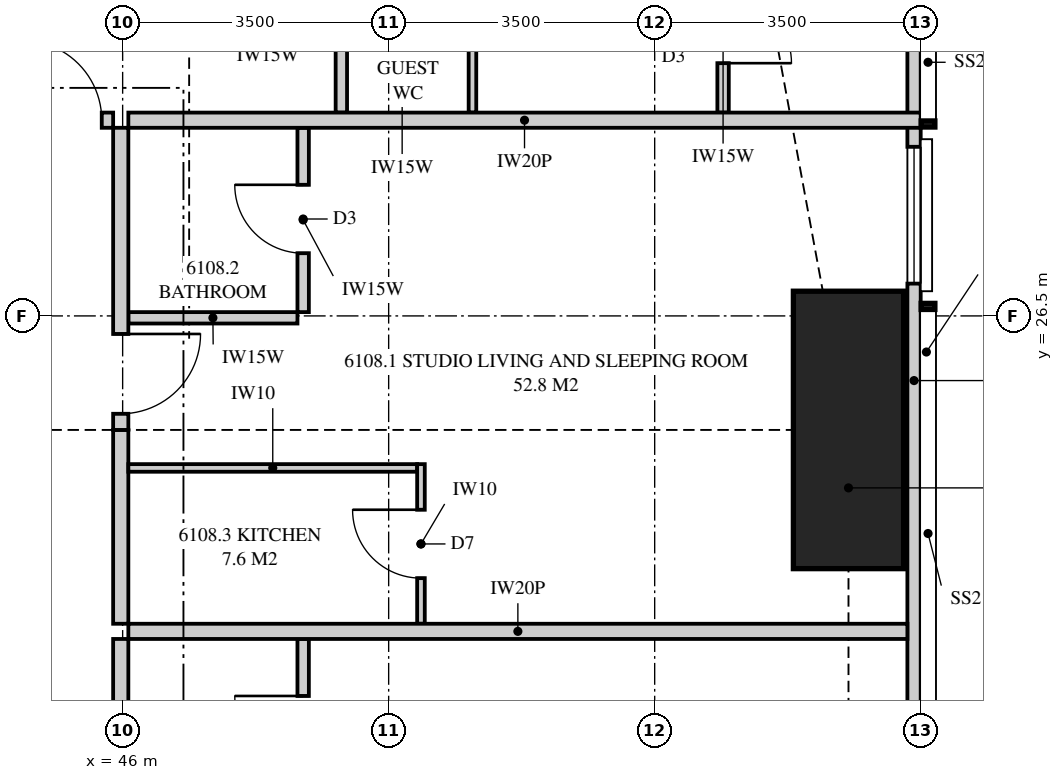
"""IFC4 building model, lengths in metres.
Left out: names, types, materials, properties, quantities, classifications, styles, units other than length and angle.
Written with IfcOpenShell. Run it as: python <this file> out.ifc"""

import sys

from ifc_helpers import new_model, si_unit, direction, frame, frame_2d, origin, origin_2d, place, context, subcontext, project, spatial, polyline, rectangle, outline, extrude, element, fill, save


model = new_model("IFC4")
c1 = context("Model", 3, precision=1e-05, world=origin(), true_north=direction((0.0, 1.0)))
c2 = subcontext(c1, "Body", "Model", "MODEL_VIEW")
j1 = project(units=[si_unit("LENGTHUNIT", "METRE"), si_unit("PLANEANGLEUNIT", "RADIAN")], contexts=[c1])
p1 = place(None, origin())
s1 = spatial("IfcSite", under=j1, at=p1, CompositionType="ELEMENT")
p2 = place(p1, origin())
s2 = spatial("IfcBuilding", under=s1, at=p2, CompositionType="ELEMENT")
p3 = place(p2, frame((0.0, 0.0, 224.95)))
s3 = spatial("IfcBuildingStorey", under=s2, at=p3, CompositionType="ELEMENT", Elevation=224.95)
p4 = place(p3, frame((55.55, 25.0, 0.0), z_axis=(0.0, 0.0, 1.0), x_axis=(1.0, 0.0, 0.0)))
e1 = element("IfcColumn", 1, at=p4, inside=s3, PredefinedType="COLUMN", context=c2, shape_type="SweptSolid", body=[
    extrude(rectangle(XDim=1.45, YDim=3.65, at=origin_2d()), origin(), (0.0, 0.0, 1.0), 3.5),
])
p5 = place(p3, frame((56.413, 20.35, 0.0), z_axis=(0.0, 0.0, 1.0), x_axis=(0.0, 1.0, 0.0)))
e2 = element("IfcWall", 2, at=p5, inside=s3, PredefinedType="SOLIDWALL", context=c2, shape_type="SweptSolid", body=[
    extrude(outline(polyline([(0.0, 0.0), (10.599, 0.0), (10.599, 3.26), (4.858, 3.26), (4.858, 2.3), (4.793, 2.3), (4.793, 3.26), (4.65, 3.26), (4.65, 2.3), (0.0, 2.3), (0.0, 0.0)])), frame((0.0, 0.087, 0.0), z_axis=(0.0, -1.0, 0.0), x_axis=(1.0, 0.0, 0.0)), (0.0, 0.0, 1.0), 0.175),
])
p6 = place(p5, frame((6.575, 0.0, 0.4)))
e3 = element("IfcOpeningElement", 3, at=p6, cuts=e2, PredefinedType="OPENING", context=c2, shape_type="SweptSolid", body=[
    extrude(rectangle(XDim=1.8, YDim=1.85, at=frame_2d((0.9, 0.925))), frame((0.0, 0.097, 0.0), z_axis=(0.0, -1.0, 0.0), x_axis=(1.0, 0.0, 0.0)), (0.0, 0.0, 1.0), 0.195),
])
p7 = place(p3, frame((38.8, 29.075, 0.0), z_axis=(0.0, 0.0, 1.0), x_axis=(1.0, 0.0, 0.0)))
e4 = element("IfcWall", 4, at=p7, inside=s3, PredefinedType="PARTITIONING", context=c2, shape_type="SweptSolid", body=[
    extrude(outline(polyline([(0.0, 0.0), (7.075, 0.0), (7.075, 3.26), (7.075, 2.66), (6.765, 2.66), (6.765, 3.26), (0.0, 3.26), (0.0, 0.0)])), frame((0.0, 0.1, 0.0), z_axis=(0.0, -1.0, 0.0), x_axis=(1.0, 0.0, 0.0)), (0.0, 0.0, 1.0), 0.2),
])
p8 = place(p7, frame((5.875, 0.0, 0.0)))
e5 = element("IfcOpeningElement", 5, at=p8, cuts=e4, PredefinedType="OPENING", context=c2, shape_type="SweptSolid", body=[
    extrude(rectangle(XDim=1.05, YDim=2.2, at=frame_2d((0.525, 1.1))), frame((0.0, 0.11, 0.0), z_axis=(0.0, -1.0, 0.0), x_axis=(1.0, 0.0, 0.0)), (0.0, 0.0, 1.0), 0.22),
])
p9 = place(p3, frame((53.9, 31.4, 0.0), z_axis=(0.0, 0.0, 1.0), x_axis=(0.0, -1.0, 0.0)))
e6 = element("IfcWall", 6, at=p9, inside=s3, PredefinedType="PLUMBINGWALL", context=c2, shape_type="SweptSolid", body=[
    extrude(outline(polyline([(0.0, 0.0), (2.225, 0.0), (2.225, 3.26), (2.225, 2.3), (0.438, 2.3), (0.0, 2.3), (0.0, 3.26), (0.0, 0.0)])), frame((0.0, 0.075, 0.0), z_axis=(0.0, -1.0, 0.0), x_axis=(1.0, 0.0, 0.0)), (0.0, 0.0, 1.0), 0.15),
])
p10 = place(p9, frame((0.675, 0.0, 0.0)))
e7 = element("IfcOpeningElement", 7, at=p10, cuts=e6, PredefinedType="OPENING", context=c2, shape_type="SweptSolid", body=[
    extrude(rectangle(XDim=0.9, YDim=2.1, at=frame_2d((0.45, 1.05))), frame((0.0, 0.085, 0.0), z_axis=(0.0, -1.0, 0.0), x_axis=(1.0, 0.0, 0.0)), (0.0, 0.0, 1.0), 0.17),
])
p11 = place(p3, frame((50.603, 33.825, 0.0), z_axis=(0.0, 0.0, 1.0), x_axis=(0.0, -1.0, 0.0)))
e8 = element("IfcWall", 8, at=p11, inside=s3, PredefinedType="PARTITIONING", context=c2, shape_type="SweptSolid", body=[
    extrude(outline(polyline([(0.0, 0.0), (4.65, 0.0), (4.65, 3.26), (2.279, 3.26), (2.279, 2.3), (0.534, 2.3), (0.534, 3.26), (0.0, 3.26), (0.0, 0.0)])), frame((0.0, 0.05, 0.0), z_axis=(0.0, -1.0, 0.0), x_axis=(1.0, 0.0, 0.0)), (0.0, 0.0, 1.0), 0.1),
])
p12 = place(p11, frame((0.15, 0.0, 0.0)))
e9 = element("IfcOpeningElement", 9, at=p12, cuts=e8, PredefinedType="OPENING", context=c2, shape_type="SweptSolid", body=[
    extrude(rectangle(XDim=0.9, YDim=2.1, at=frame_2d((0.45, 1.05))), frame((0.0, 0.06, 0.0), z_axis=(0.0, -1.0, 0.0), x_axis=(1.0, 0.0, 0.0)), (0.0, 0.0, 1.0), 0.12),
])
p13 = place(p3, frame((46.075, 29.075, 0.0), z_axis=(0.0, 0.0, 1.0), x_axis=(1.0, 0.0, 0.0)))
e10 = element("IfcWall", 10, at=p13, inside=s3, PredefinedType="PARTITIONING", context=c2, shape_type="SweptSolid", body=[
    extrude(outline(polyline([(0.0, 0.0), (10.425, 0.0), (10.425, 3.26), (9.646, 3.26), (9.646, 2.3), (7.795, 2.3), (7.795, 3.26), (2.11, 3.26), (2.11, 2.66), (0.0, 2.66), (0.0, 3.26), (0.0, 0.0)])), frame((0.0, 0.1, 0.0), z_axis=(0.0, -1.0, 0.0), x_axis=(1.0, 0.0, 0.0)), (0.0, 0.0, 1.0), 0.2),
])
p14 = place(p3, frame((56.325, 22.35, 0.0), z_axis=(0.0, 0.0, 1.0), x_axis=(-1.0, 0.0, 0.0)))
e11 = element("IfcWall", 11, at=p14, inside=s3, PredefinedType="PARTITIONING", context=c2, shape_type="SweptSolid", body=[
    extrude(outline(polyline([(0.0, 0.0), (10.25, 0.0), (10.25, 3.26), (1.685, 3.26), (1.685, 2.3), (0.0, 2.3), (0.0, 3.26), (0.0, 0.0)])), frame((0.0, 0.1, 0.0), z_axis=(0.0, -1.0, 0.0), x_axis=(1.0, 0.0, 0.0)), (0.0, 0.0, 1.0), 0.2),
])
p15 = place(p3, frame((45.975, 14.25, 0.0), z_axis=(0.0, 0.0, 1.0), x_axis=(0.0, 1.0, 0.0)))
e12 = element("IfcWall", 12, at=p15, inside=s3, PredefinedType="PARTITIONING", context=c2, shape_type="SweptSolid", body=[
    extrude(outline(polyline([(0.0, 0.0), (8.0, 0.0), (8.0, 3.26), (5.81, 3.26), (5.81, 2.66), (3.19, 2.66), (3.19, 3.26), (0.06, 3.26), (0.06, 2.66), (0.0, 2.66), (0.0, 3.26), (0.0, 0.0)])), frame((0.0, 0.1, 0.0), z_axis=(0.0, -1.0, 0.0), x_axis=(1.0, 0.0, 0.0)), (0.0, 0.0, 1.0), 0.2),
])
p16 = place(p15, frame((3.5, 0.0, 0.0)))
e13 = element("IfcOpeningElement", 13, at=p16, cuts=e12, PredefinedType="OPENING", context=c2, shape_type="SweptSolid", body=[
    extrude(rectangle(XDim=1.05, YDim=2.2, at=frame_2d((0.525, 1.1))), frame((0.0, 0.11, 0.0), z_axis=(0.0, -1.0, 0.0), x_axis=(1.0, 0.0, 0.0)), (0.0, 0.0, 1.0), 0.22),
])
p17 = place(p3, frame((48.375, 19.825, 0.0), z_axis=(0.0, 0.0, 1.0), x_axis=(0.0, 1.0, 0.0)))
e14 = element("IfcWall", 14, at=p17, inside=s3, PredefinedType="PLUMBINGWALL", context=c2, shape_type="SweptSolid", body=[
    extrude(outline(polyline([(0.0, 0.0), (2.425, 0.0), (2.425, 3.26), (0.21, 3.26), (0.21, 2.66), (0.0, 2.66), (0.0, 3.26), (0.0, 0.0)])), frame((0.0, 0.075, 0.0), z_axis=(0.0, -1.0, 0.0), x_axis=(1.0, 0.0, 0.0)), (0.0, 0.0, 1.0), 0.15),
])
p18 = place(p17, frame((0.775, 0.0, 0.0)))
e15 = element("IfcOpeningElement", 15, at=p18, cuts=e14, PredefinedType="OPENING", context=c2, shape_type="SweptSolid", body=[
    extrude(rectangle(XDim=0.9, YDim=2.1, at=frame_2d((0.45, 1.05))), frame((0.0, 0.085, 0.0), z_axis=(0.0, -1.0, 0.0), x_axis=(1.0, 0.0, 0.0)), (0.0, 0.0, 1.0), 0.17),
])
p19 = place(p3, frame((45.975, 22.45, 0.0), z_axis=(0.0, 0.0, 1.0), x_axis=(0.0, 1.0, 0.0)))
e16 = element("IfcWall", 16, at=p19, inside=s3, PredefinedType="PARTITIONING", context=c2, shape_type="SweptSolid", body=[
    extrude(outline(polyline([(0.0, 0.0), (2.55, 0.0), (2.55, 2.66), (1.24, 2.66), (1.24, 3.26), (0.0, 3.26), (0.0, 0.0)])), frame((0.0, 0.1, 0.0), z_axis=(0.0, -1.0, 0.0), x_axis=(1.0, 0.0, 0.0)), (0.0, 0.0, 1.0), 0.2),
])
p20 = place(p3, frame((45.975, 25.0, 0.0), z_axis=(0.0, 0.0, 1.0), x_axis=(0.0, 1.0, 0.0)))
e17 = element("IfcWall", 17, at=p20, inside=s3, PredefinedType="PARTITIONING", context=c2, shape_type="SweptSolid", body=[
    extrude(rectangle(XDim=3.975, YDim=0.2, at=frame_2d((1.988, 0.0))), origin(), (0.0, 0.0, 1.0), 2.66),
])
p21 = place(p20, frame((0.212, 0.0, 0.0)))
e18 = element("IfcOpeningElement", 18, at=p21, cuts=e17, PredefinedType="OPENING", context=c2, shape_type="SweptSolid", body=[
    extrude(rectangle(XDim=1.05, YDim=2.2, at=frame_2d((0.525, 1.1))), frame((0.0, 0.11, 0.0), z_axis=(0.0, -1.0, 0.0), x_axis=(1.0, 0.0, 0.0)), (0.0, 0.0, 1.0), 0.22),
])
p22 = place(p3, frame((48.375, 26.55, 0.0), z_axis=(0.0, 0.0, 1.0), x_axis=(0.0, 1.0, 0.0)))
e19 = element("IfcWall", 19, at=p22, inside=s3, PredefinedType="PLUMBINGWALL", context=c2, shape_type="SweptSolid", body=[
    extrude(rectangle(XDim=2.425, YDim=0.15, at=frame_2d((1.212, 0.0))), origin(), (0.0, 0.0, 1.0), 3.26),
])
p23 = place(p22, frame((0.775, 0.0, 0.0)))
e20 = element("IfcOpeningElement", 20, at=p23, cuts=e19, PredefinedType="OPENING", context=c2, shape_type="SweptSolid", body=[
    extrude(rectangle(XDim=0.9, YDim=2.1, at=frame_2d((0.45, 1.05))), frame((0.0, 0.085, 0.0), z_axis=(0.0, -1.0, 0.0), x_axis=(1.0, 0.0, 0.0)), (0.0, 0.0, 1.0), 0.17),
])
p24 = place(p3, frame((48.3, 26.475, 0.0), z_axis=(0.0, 0.0, 1.0), x_axis=(-1.0, 0.0, 0.0)))
e21 = element("IfcWall", 21, at=p24, inside=s3, PredefinedType="PLUMBINGWALL", context=c2, shape_type="SweptSolid", body=[
    extrude(outline(polyline([(0.0, 0.0), (2.225, 0.0), (2.225, 3.26), (2.225, 2.66), (0.14, 2.66), (0.14, 3.26), (0.0, 3.26), (0.0, 0.0)])), frame((0.0, 0.075, 0.0), z_axis=(0.0, -1.0, 0.0), x_axis=(1.0, 0.0, 0.0)), (0.0, 0.0, 1.0), 0.15),
])
p25 = place(p3, frame((48.877, 29.175, 0.0), z_axis=(0.0, 0.0, 1.0), x_axis=(0.0, 1.0, 0.0)))
e22 = element("IfcWall", 22, at=p25, inside=s3, PredefinedType="PLUMBINGWALL", context=c2, shape_type="SweptSolid", body=[
    extrude(rectangle(XDim=2.0, YDim=0.15, at=frame_2d((1.0, 0.0))), origin(), (0.0, 0.0, 1.0), 3.26),
])
p26 = place(p3, frame((49.925, 22.45, 0.0), z_axis=(0.0, 0.0, 1.0), x_axis=(0.0, 1.0, 0.0)))
e23 = element("IfcWall", 23, at=p26, inside=s3, PredefinedType="PARTITIONING", context=c2, shape_type="SweptSolid", body=[
    extrude(outline(polyline([(0.0, 0.0), (2.1, 0.0), (2.1, 3.26), (2.1, 2.66), (1.29, 2.66), (1.29, 3.26), (0.0, 3.26), (0.0, 0.0)])), frame((0.0, 0.05, 0.0), z_axis=(0.0, -1.0, 0.0), x_axis=(1.0, 0.0, 0.0)), (0.0, 0.0, 1.0), 0.1),
])
p27 = place(p26, frame((0.6, 0.0, 0.0)))
e24 = element("IfcOpeningElement", 24, at=p27, cuts=e23, PredefinedType="OPENING", context=c2, shape_type="SweptSolid", body=[
    extrude(rectangle(XDim=0.9, YDim=2.1, at=frame_2d((0.45, 1.05))), frame((0.0, 0.06, 0.0), z_axis=(0.0, -1.0, 0.0), x_axis=(1.0, 0.0, 0.0)), (0.0, 0.0, 1.0), 0.12),
])
p28 = place(p3, frame((46.075, 24.5, 0.0), z_axis=(0.0, 0.0, 1.0), x_axis=(1.0, 0.0, 0.0)))
e25 = element("IfcWall", 25, at=p28, inside=s3, PredefinedType="PARTITIONING", context=c2, shape_type="SweptSolid", body=[
    extrude(outline(polyline([(0.0, 0.0), (3.8, 0.0), (3.8, 3.26), (3.8, 2.66), (0.0, 2.66), (0.0, 3.26), (0.0, 0.0)])), frame((0.0, 0.05, 0.0), z_axis=(0.0, -1.0, 0.0), x_axis=(1.0, 0.0, 0.0)), (0.0, 0.0, 1.0), 0.1),
])
p29 = place(p6, origin())
e26 = element("IfcWindow", 26, at=p29, inside=s3, PartitioningType="SINGLE_PANEL", PredefinedType="WINDOW", context=c2, shape_type="SweptSolid", body=[
    extrude(rectangle(XDim=1.8, YDim=1.85, at=frame_2d((0.9, 0.925))), frame((0.0, 0.03, 0.0), z_axis=(0.0, -1.0, 0.0), x_axis=(1.0, 0.0, 0.0)), (0.0, 0.0, 1.0), 0.06),
])
fill(e3, e26)
p30 = place(p8, origin())
e27 = element("IfcDoor", 27, at=p30, inside=s3, OperationType="SINGLE_SWING_LEFT", PredefinedType="DOOR", context=c2, shape_type="SweptSolid", body=[
    extrude(rectangle(XDim=1.05, YDim=2.2, at=frame_2d((0.525, 1.1))), frame((0.0, 0.025, 0.0), z_axis=(0.0, -1.0, 0.0), x_axis=(1.0, 0.0, 0.0)), (0.0, 0.0, 1.0), 0.05),
])
fill(e5, e27)
p31 = place(p10, origin())
e28 = element("IfcDoor", 28, at=p31, inside=s3, OperationType="SINGLE_SWING_RIGHT", PredefinedType="DOOR", context=c2, shape_type="SweptSolid", body=[
    extrude(rectangle(XDim=0.9, YDim=2.1, at=frame_2d((0.45, 1.05))), frame((0.0, 0.025, 0.0), z_axis=(0.0, -1.0, 0.0), x_axis=(1.0, 0.0, 0.0)), (0.0, 0.0, 1.0), 0.05),
])
fill(e7, e28)
p32 = place(p18, origin())
e29 = element("IfcDoor", 29, at=p32, inside=s3, OperationType="SINGLE_SWING_RIGHT", PredefinedType="DOOR", context=c2, shape_type="SweptSolid", body=[
    extrude(rectangle(XDim=0.9, YDim=2.1, at=frame_2d((0.45, 1.05))), frame((0.0, 0.025, 0.0), z_axis=(0.0, -1.0, 0.0), x_axis=(1.0, 0.0, 0.0)), (0.0, 0.0, 1.0), 0.05),
])
fill(e15, e29)
p33 = place(p21, frame((1.05, 0.0, 0.0), z_axis=(0.0, 0.0, 1.0), x_axis=(-1.0, 0.0, 0.0)))
e30 = element("IfcDoor", 30, at=p33, inside=s3, OperationType="SINGLE_SWING_LEFT", PredefinedType="DOOR", context=c2, shape_type="SweptSolid", body=[
    extrude(rectangle(XDim=1.05, YDim=2.2, at=frame_2d((0.525, 1.1))), frame((0.0, 0.025, 0.0), z_axis=(0.0, -1.0, 0.0), x_axis=(1.0, 0.0, 0.0)), (0.0, 0.0, 1.0), 0.05),
])
fill(e18, e30)
p34 = place(p23, origin())
e31 = element("IfcDoor", 31, at=p34, inside=s3, OperationType="SINGLE_SWING_RIGHT", PredefinedType="DOOR", context=c2, shape_type="SweptSolid", body=[
    extrude(rectangle(XDim=0.9, YDim=2.1, at=frame_2d((0.45, 1.05))), frame((0.0, 0.025, 0.0), z_axis=(0.0, -1.0, 0.0), x_axis=(1.0, 0.0, 0.0)), (0.0, 0.0, 1.0), 0.05),
])
fill(e20, e31)
p35 = place(p27, origin())
e32 = element("IfcDoor", 32, at=p35, inside=s3, OperationType="SINGLE_SWING_RIGHT", PredefinedType="DOOR", context=c2, shape_type="SweptSolid", body=[
    extrude(rectangle(XDim=0.9, YDim=2.1, at=frame_2d((0.45, 1.05))), frame((0.0, 0.025, 0.0), z_axis=(0.0, -1.0, 0.0), x_axis=(1.0, 0.0, 0.0)), (0.0, 0.0, 1.0), 0.05),
])
fill(e24, e32)
save(model, sys.argv[1])
